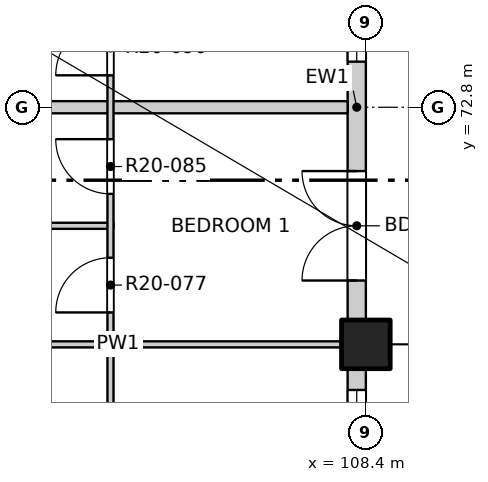
"""IFC4 building model, lengths in metres.
Left out: names, types, materials, properties, quantities, classifications, styles, units other than length and angle.
Written with IfcOpenShell. Run it as: python <this file> out.ifc"""

import sys

from ifc_helpers import new_model, si_unit, direction, frame, frame_2d, origin, origin_2d, place, context, subcontext, project, spatial, rectangle, extrude, element, fill, save


model = new_model("IFC4")
c1 = context("Model", 3, precision=1e-05, world=origin(), true_north=direction((0.0, 1.0)))
c2 = subcontext(c1, "Body", "Model", "MODEL_VIEW")
j1 = project(units=[si_unit("LENGTHUNIT", "METRE"), si_unit("PLANEANGLEUNIT", "RADIAN")], contexts=[c1])
p1 = place(None, origin())
s1 = spatial("IfcSite", under=j1, at=p1, CompositionType="ELEMENT")
p2 = place(p1, origin())
s2 = spatial("IfcBuilding", under=s1, at=p2, CompositionType="ELEMENT")
p3 = place(p2, frame((0.0, 0.0, 204.1)))
s3 = spatial("IfcBuildingStorey", under=s2, at=p3, CompositionType="ELEMENT", Elevation=204.1)
p4 = place(p3, frame((108.4, 68.9, -0.25), z_axis=(0.0, 0.0, 1.0), x_axis=(1.0, 0.0, 0.0)))
e1 = element("IfcColumn", 1, at=p4, inside=s3, PredefinedType="COLUMN", context=c2, shape_type="SweptSolid", body=[
    extrude(rectangle(XDim=0.8, YDim=0.8, at=origin_2d()), origin(), (0.0, 0.0, 1.0), 3.4),
])
p5 = place(p3, frame((108.25, 61.5, 0.0), z_axis=(0.0, 0.0, 1.0), x_axis=(0.0, 1.0, 0.0)))
e2 = element("IfcWall", 2, at=p5, inside=s3, PredefinedType="SOLIDWALL", context=c2, shape_type="SweptSolid", body=[
    extrude(rectangle(XDim=7.0, YDim=0.3, at=frame_2d((3.5, 0.0))), origin(), (0.0, 0.0, 1.0), 2.7),
])
p6 = place(p5, frame((0.65, 0.0, 0.0)))
e3 = element("IfcOpeningElement", 3, at=p6, cuts=e2, PredefinedType="OPENING", context=c2, shape_type="SweptSolid", body=[
    extrude(rectangle(XDim=1.8, YDim=2.4, at=frame_2d((0.9, 1.2))), frame((0.0, 0.16, 0.0), z_axis=(0.0, -1.0, 0.0), x_axis=(1.0, 0.0, 0.0)), (0.0, 0.0, 1.0), 0.32),
])
p7 = place(p5, frame((4.25, 0.0, 0.9)))
e4 = element("IfcOpeningElement", 4, at=p7, cuts=e2, PredefinedType="OPENING", context=c2, shape_type="SweptSolid", body=[
    extrude(rectangle(XDim=2.4, YDim=1.8, at=frame_2d((1.2, 0.9))), frame((0.0, 0.16, 0.0), z_axis=(0.0, -1.0, 0.0), x_axis=(1.0, 0.0, 0.0)), (0.0, 0.0, 1.0), 0.32),
])
p8 = place(p3, frame((108.25, 69.3, 0.0), z_axis=(0.0, 0.0, 1.0), x_axis=(0.0, 1.0, 0.0)))
e5 = element("IfcWall", 5, at=p8, inside=s3, PredefinedType="SOLIDWALL", context=c2, shape_type="SweptSolid", body=[
    extrude(rectangle(XDim=7.0, YDim=0.3, at=frame_2d((3.5, 0.0))), origin(), (0.0, 0.0, 1.0), 2.7),
])
p9 = place(p8, frame((0.65, 0.0, 0.0)))
e6 = element("IfcOpeningElement", 6, at=p9, cuts=e5, PredefinedType="OPENING", context=c2, shape_type="SweptSolid", body=[
    extrude(rectangle(XDim=1.8, YDim=2.4, at=frame_2d((0.9, 1.2))), frame((0.0, 0.16, 0.0), z_axis=(0.0, -1.0, 0.0), x_axis=(1.0, 0.0, 0.0)), (0.0, 0.0, 1.0), 0.32),
])
p10 = place(p8, frame((4.25, 0.0, 0.9)))
e7 = element("IfcOpeningElement", 7, at=p10, cuts=e5, PredefinedType="OPENING", context=c2, shape_type="SweptSolid", body=[
    extrude(rectangle(XDim=2.4, YDim=1.8, at=frame_2d((1.2, 0.9))), frame((0.0, 0.16, 0.0), z_axis=(0.0, -1.0, 0.0), x_axis=(1.0, 0.0, 0.0)), (0.0, 0.0, 1.0), 0.32),
])
p11 = place(p3, frame((100.55, 68.9, 0.0), z_axis=(0.0, 0.0, 1.0), x_axis=(1.0, 0.0, 0.0)))
e8 = element("IfcWall", 8, at=p11, inside=s3, PredefinedType="PARTITIONING", context=c2, shape_type="SweptSolid", body=[
    extrude(rectangle(XDim=7.55, YDim=0.1, at=frame_2d((3.775, 0.0))), origin(), (0.0, 0.0, 1.0), 2.55),
])
p12 = place(p3, frame((100.55, 70.85, 0.0), z_axis=(0.0, 0.0, 1.0), x_axis=(1.0, 0.0, 0.0)))
e9 = element("IfcWall", 9, at=p12, inside=s3, PredefinedType="PARTITIONING", context=c2, shape_type="SweptSolid", body=[
    extrude(rectangle(XDim=3.7, YDim=0.1, at=frame_2d((1.85, 0.0))), origin(), (0.0, 0.0, 1.0), 3.15),
])
p13 = place(p3, frame((96.6, 72.8, 0.0), z_axis=(0.0, 0.0, 1.0), x_axis=(1.0, 0.0, 0.0)))
e10 = element("IfcWall", 10, at=p13, inside=s3, PredefinedType="PARTITIONING", context=c2, shape_type="SweptSolid", body=[
    extrude(rectangle(XDim=11.5, YDim=0.2, at=frame_2d((5.75, 0.0))), origin(), (0.0, 0.0, 1.0), 3.15),
])
p14 = place(p3, frame((104.2, 61.2, 0.0), z_axis=(0.0, 0.0, 1.0), x_axis=(0.0, 1.0, 0.0)))
e11 = element("IfcWall", 11, at=p14, inside=s3, PredefinedType="PARTITIONING", context=c2, shape_type="SweptSolid", body=[
    extrude(rectangle(XDim=26.9, YDim=0.1, at=frame_2d((13.45, 0.0))), origin(), (0.0, 0.0, 1.0), 3.15),
])
p15 = place(p14, frame((1.25, 0.0, 0.0)))
e12 = element("IfcOpeningElement", 12, at=p15, cuts=e11, PredefinedType="OPENING", context=c2, shape_type="SweptSolid", body=[
    extrude(rectangle(XDim=1.2, YDim=2.1, at=frame_2d((0.6, 1.05))), frame((0.0, 0.06, 0.0), z_axis=(0.0, -1.0, 0.0), x_axis=(1.0, 0.0, 0.0)), (0.0, 0.0, 1.0), 0.12),
])
p16 = place(p14, frame((5.15, 0.0, 0.0)))
e13 = element("IfcOpeningElement", 13, at=p16, cuts=e11, PredefinedType="OPENING", context=c2, shape_type="SweptSolid", body=[
    extrude(rectangle(XDim=1.2, YDim=2.1, at=frame_2d((0.6, 1.05))), frame((0.0, 0.06, 0.0), z_axis=(0.0, -1.0, 0.0), x_axis=(1.0, 0.0, 0.0)), (0.0, 0.0, 1.0), 0.12),
])
p17 = place(p14, frame((8.225, 0.0, 0.0)))
e14 = element("IfcOpeningElement", 14, at=p17, cuts=e11, PredefinedType="OPENING", context=c2, shape_type="SweptSolid", body=[
    extrude(rectangle(XDim=0.9, YDim=2.1, at=frame_2d((0.45, 1.05))), frame((0.0, 0.06, 0.0), z_axis=(0.0, -1.0, 0.0), x_axis=(1.0, 0.0, 0.0)), (0.0, 0.0, 1.0), 0.12),
])
p18 = place(p14, frame((10.175, 0.0, 0.0)))
e15 = element("IfcOpeningElement", 15, at=p18, cuts=e11, PredefinedType="OPENING", context=c2, shape_type="SweptSolid", body=[
    extrude(rectangle(XDim=0.9, YDim=2.1, at=frame_2d((0.45, 1.05))), frame((0.0, 0.06, 0.0), z_axis=(0.0, -1.0, 0.0), x_axis=(1.0, 0.0, 0.0)), (0.0, 0.0, 1.0), 0.12),
])
p19 = place(p14, frame((12.125, 0.0, 0.0)))
e16 = element("IfcOpeningElement", 16, at=p19, cuts=e11, PredefinedType="OPENING", context=c2, shape_type="SweptSolid", body=[
    extrude(rectangle(XDim=0.9, YDim=2.1, at=frame_2d((0.45, 1.05))), frame((0.0, 0.06, 0.0), z_axis=(0.0, -1.0, 0.0), x_axis=(1.0, 0.0, 0.0)), (0.0, 0.0, 1.0), 0.12),
])
p20 = place(p14, frame((14.075, 0.0, 0.0)))
e17 = element("IfcOpeningElement", 17, at=p20, cuts=e11, PredefinedType="OPENING", context=c2, shape_type="SweptSolid", body=[
    extrude(rectangle(XDim=0.9, YDim=2.1, at=frame_2d((0.45, 1.05))), frame((0.0, 0.06, 0.0), z_axis=(0.0, -1.0, 0.0), x_axis=(1.0, 0.0, 0.0)), (0.0, 0.0, 1.0), 0.12),
])
p21 = place(p14, frame((16.85, 0.0, 0.0)))
e18 = element("IfcOpeningElement", 18, at=p21, cuts=e11, PredefinedType="OPENING", context=c2, shape_type="SweptSolid", body=[
    extrude(rectangle(XDim=1.2, YDim=2.1, at=frame_2d((0.6, 1.05))), frame((0.0, 0.06, 0.0), z_axis=(0.0, -1.0, 0.0), x_axis=(1.0, 0.0, 0.0)), (0.0, 0.0, 1.0), 0.12),
])
p22 = place(p14, frame((19.925, 0.0, 0.0)))
e19 = element("IfcOpeningElement", 19, at=p22, cuts=e11, PredefinedType="OPENING", context=c2, shape_type="SweptSolid", body=[
    extrude(rectangle(XDim=0.9, YDim=2.1, at=frame_2d((0.45, 1.05))), frame((0.0, 0.06, 0.0), z_axis=(0.0, -1.0, 0.0), x_axis=(1.0, 0.0, 0.0)), (0.0, 0.0, 1.0), 0.12),
])
p23 = place(p14, frame((21.875, 0.0, 0.0)))
e20 = element("IfcOpeningElement", 20, at=p23, cuts=e11, PredefinedType="OPENING", context=c2, shape_type="SweptSolid", body=[
    extrude(rectangle(XDim=0.9, YDim=2.1, at=frame_2d((0.45, 1.05))), frame((0.0, 0.06, 0.0), z_axis=(0.0, -1.0, 0.0), x_axis=(1.0, 0.0, 0.0)), (0.0, 0.0, 1.0), 0.12),
])
p24 = place(p14, frame((24.65, 0.0, 0.0)))
e21 = element("IfcOpeningElement", 21, at=p24, cuts=e11, PredefinedType="OPENING", context=c2, shape_type="SweptSolid", body=[
    extrude(rectangle(XDim=1.2, YDim=2.1, at=frame_2d((0.6, 1.05))), frame((0.0, 0.06, 0.0), z_axis=(0.0, -1.0, 0.0), x_axis=(1.0, 0.0, 0.0)), (0.0, 0.0, 1.0), 0.12),
])
p25 = place(p7, origin())
e22 = element("IfcWindow", 22, at=p25, inside=s3, PartitioningType="DOUBLE_PANEL_VERTICAL", PredefinedType="WINDOW", context=c2, shape_type="SweptSolid", body=[
    extrude(rectangle(XDim=2.4, YDim=1.8, at=frame_2d((1.2, 0.9))), frame((0.0, 0.03, 0.0), z_axis=(0.0, -1.0, 0.0), x_axis=(1.0, 0.0, 0.0)), (0.0, 0.0, 1.0), 0.06),
])
fill(e4, e22)
p26 = place(p9, origin())
e23 = element("IfcDoor", 23, at=p26, inside=s3, OperationType="DOUBLE_DOOR_SINGLE_SWING", PredefinedType="DOOR", context=c2, shape_type="SweptSolid", body=[
    extrude(rectangle(XDim=1.8, YDim=2.4, at=frame_2d((0.9, 1.2))), frame((0.0, 0.025, 0.0), z_axis=(0.0, -1.0, 0.0), x_axis=(1.0, 0.0, 0.0)), (0.0, 0.0, 1.0), 0.05),
])
fill(e6, e23)
p27 = place(p10, origin())
e24 = element("IfcWindow", 24, at=p27, inside=s3, PartitioningType="DOUBLE_PANEL_VERTICAL", PredefinedType="WINDOW", context=c2, shape_type="SweptSolid", body=[
    extrude(rectangle(XDim=2.4, YDim=1.8, at=frame_2d((1.2, 0.9))), frame((0.0, 0.03, 0.0), z_axis=(0.0, -1.0, 0.0), x_axis=(1.0, 0.0, 0.0)), (0.0, 0.0, 1.0), 0.06),
])
fill(e7, e24)
p28 = place(p17, origin())
e25 = element("IfcDoor", 25, at=p28, inside=s3, OperationType="SINGLE_SWING_LEFT", PredefinedType="DOOR", context=c2, shape_type="SweptSolid", body=[
    extrude(rectangle(XDim=0.9, YDim=2.1, at=frame_2d((0.45, 1.05))), frame((0.0, 0.025, 0.0), z_axis=(0.0, -1.0, 0.0), x_axis=(1.0, 0.0, 0.0)), (0.0, 0.0, 1.0), 0.05),
])
fill(e14, e25)
p29 = place(p18, origin())
e26 = element("IfcDoor", 26, at=p29, inside=s3, OperationType="SINGLE_SWING_RIGHT", PredefinedType="DOOR", context=c2, shape_type="SweptSolid", body=[
    extrude(rectangle(XDim=0.9, YDim=2.1, at=frame_2d((0.45, 1.05))), frame((0.0, 0.025, 0.0), z_axis=(0.0, -1.0, 0.0), x_axis=(1.0, 0.0, 0.0)), (0.0, 0.0, 1.0), 0.05),
])
fill(e15, e26)
p30 = place(p19, origin())
e27 = element("IfcDoor", 27, at=p30, inside=s3, OperationType="SINGLE_SWING_LEFT", PredefinedType="DOOR", context=c2, shape_type="SweptSolid", body=[
    extrude(rectangle(XDim=0.9, YDim=2.1, at=frame_2d((0.45, 1.05))), frame((0.0, 0.025, 0.0), z_axis=(0.0, -1.0, 0.0), x_axis=(1.0, 0.0, 0.0)), (0.0, 0.0, 1.0), 0.05),
])
fill(e16, e27)
save(model, sys.argv[1])
